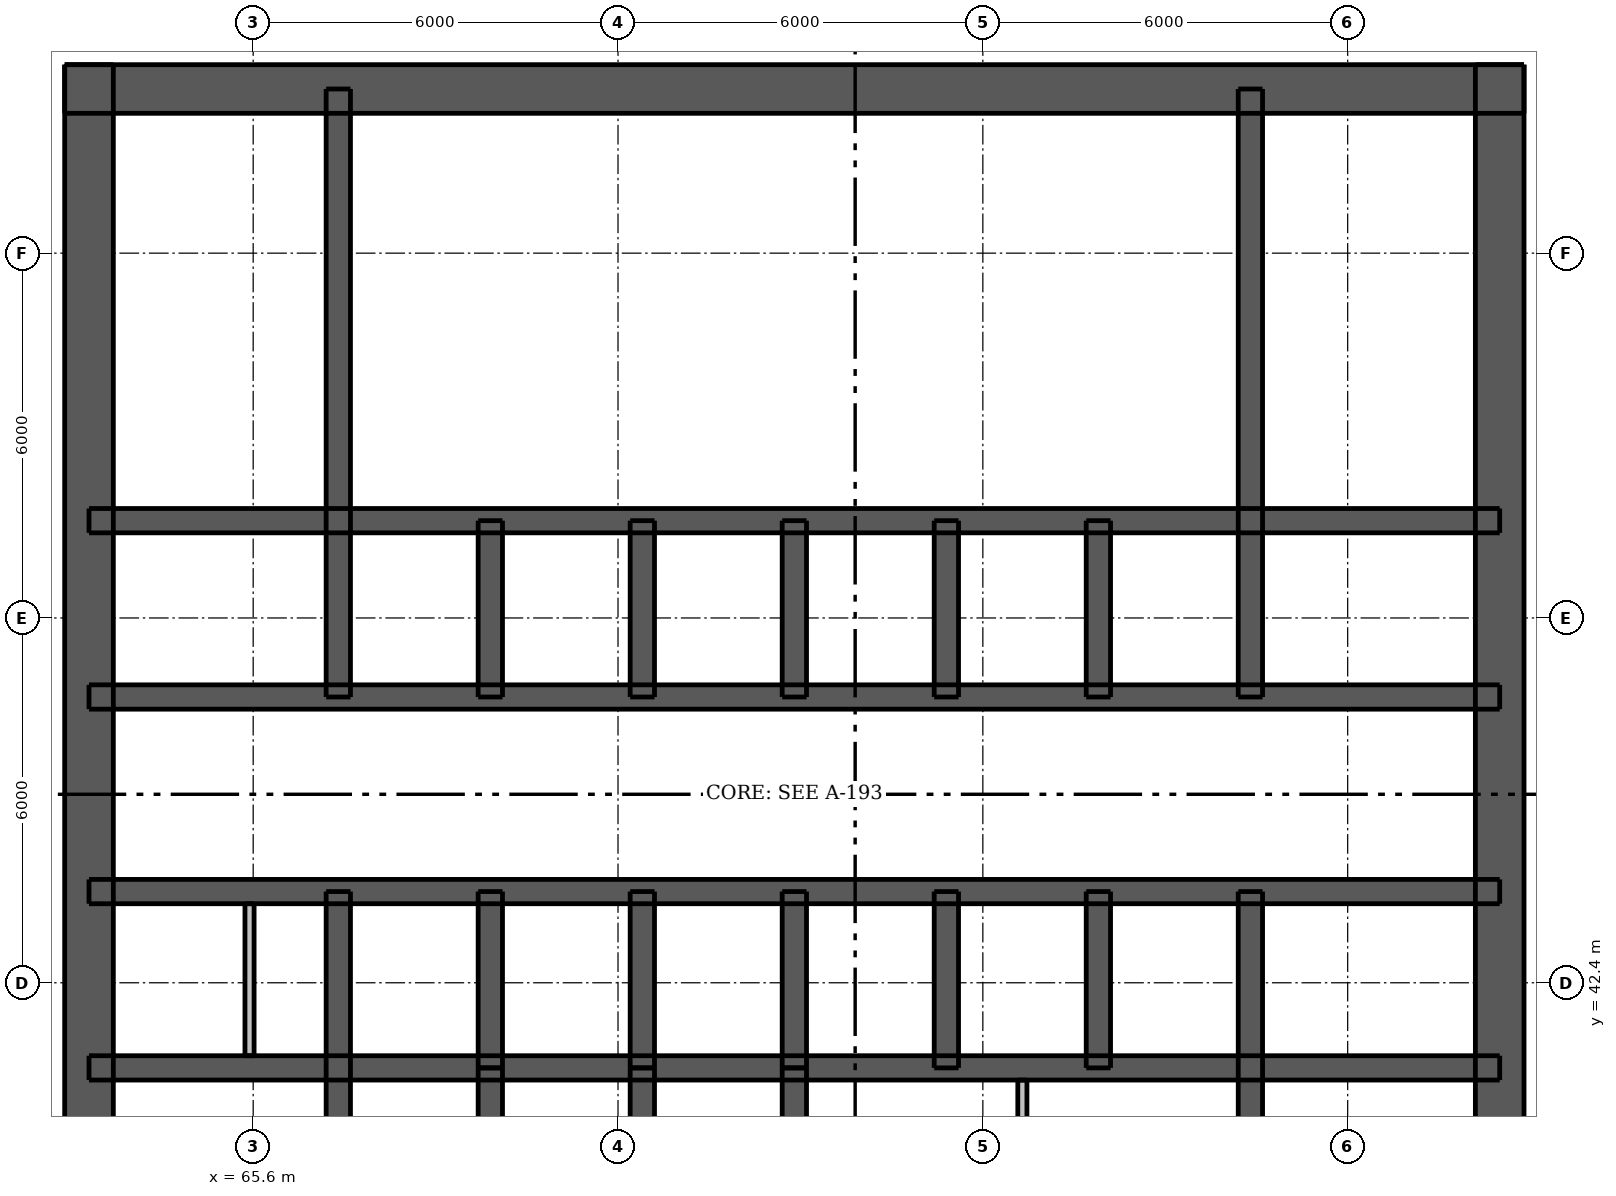
"""IFC4 building model, lengths in metres.
Left out: names, types, materials, properties, quantities, classifications, styles, units other than length and angle.
Written with IfcOpenShell. Run it as: python <this file> out.ifc"""

import sys

from ifc_helpers import new_model, si_unit, direction, frame, frame_2d, origin, place, context, subcontext, project, spatial, rectangle, extrude, element, fill, save


model = new_model("IFC4")
c1 = context("Model", 3, precision=1e-05, world=origin(), true_north=direction((0.0, 1.0)))
c2 = subcontext(c1, "Body", "Model", "MODEL_VIEW")
j1 = project(units=[si_unit("LENGTHUNIT", "METRE"), si_unit("PLANEANGLEUNIT", "RADIAN")], contexts=[c1])
p1 = place(None, origin())
s1 = spatial("IfcSite", under=j1, at=p1, CompositionType="ELEMENT")
p2 = place(p1, origin())
s2 = spatial("IfcBuilding", under=s1, at=p2, CompositionType="ELEMENT")
p3 = place(p2, frame((0.0, 0.0, 95.2)))
s3 = spatial("IfcBuildingStorey", under=s2, at=p3, CompositionType="ELEMENT", Elevation=95.2)
p4 = place(p3, frame((62.5, 57.1, 0.0), z_axis=(0.0, 0.0, 1.0), x_axis=(1.0, 0.0, 0.0)))
e1 = element("IfcWall", 1, at=p4, inside=s3, PredefinedType="SHEAR", context=c2, shape_type="SweptSolid", body=[
    extrude(rectangle(XDim=24.0, YDim=0.8, at=frame_2d((12.0, 0.0))), origin(), (0.0, 0.0, 1.0), 3.05),
])
p5 = place(p4, frame((20.9, 0.0, 0.0)))
e2 = element("IfcOpeningElement", 2, at=p5, cuts=e1, PredefinedType="OPENING", context=c2, shape_type="SweptSolid", body=[
    extrude(rectangle(XDim=1.1, YDim=2.1, at=frame_2d((0.55, 1.05))), frame((0.0, 0.41, 0.0), z_axis=(0.0, -1.0, 0.0), x_axis=(1.0, 0.0, 0.0)), (0.0, 0.0, 1.0), 0.82),
])
p6 = place(p4, frame((2.0, 0.0, 0.0)))
e3 = element("IfcOpeningElement", 3, at=p6, cuts=e1, PredefinedType="OPENING", context=c2, shape_type="SweptSolid", body=[
    extrude(rectangle(XDim=1.1, YDim=2.1, at=frame_2d((0.55, 1.05))), frame((0.0, 0.41, 0.0), z_axis=(0.0, -1.0, 0.0), x_axis=(1.0, 0.0, 0.0)), (0.0, 0.0, 1.0), 0.82),
])
p7 = place(p4, frame((11.55, 0.0, 0.0)))
e4 = element("IfcOpeningElement", 4, at=p7, cuts=e1, PredefinedType="OPENING", context=c2, shape_type="SweptSolid", body=[
    extrude(rectangle(XDim=0.9, YDim=2.1, at=frame_2d((0.45, 1.05))), frame((0.0, 0.41, 0.0), z_axis=(0.0, -1.0, 0.0), x_axis=(1.0, 0.0, 0.0)), (0.0, 0.0, 1.0), 0.82),
])
p8 = place(p3, frame((62.9, 33.5, 0.0), z_axis=(0.0, 0.0, 1.0), x_axis=(0.0, 1.0, 0.0)))
e5 = element("IfcWall", 5, at=p8, inside=s3, PredefinedType="SHEAR", context=c2, shape_type="SweptSolid", body=[
    extrude(rectangle(XDim=24.0, YDim=0.8, at=frame_2d((12.0, 0.0))), origin(), (0.0, 0.0, 1.0), 3.05),
])
p9 = place(p8, frame((11.2, 0.0, 0.0)))
e6 = element("IfcOpeningElement", 6, at=p9, cuts=e5, PredefinedType="OPENING", context=c2, shape_type="SweptSolid", body=[
    extrude(rectangle(XDim=1.6, YDim=2.1, at=frame_2d((0.8, 1.05))), frame((0.0, 0.41, 0.0), z_axis=(0.0, -1.0, 0.0), x_axis=(1.0, 0.0, 0.0)), (0.0, 0.0, 1.0), 0.82),
])
p10 = place(p3, frame((86.1, 33.5, 0.0), z_axis=(0.0, 0.0, 1.0), x_axis=(0.0, 1.0, 0.0)))
e7 = element("IfcWall", 7, at=p10, inside=s3, PredefinedType="SHEAR", context=c2, shape_type="SweptSolid", body=[
    extrude(rectangle(XDim=24.0, YDim=0.8, at=frame_2d((12.0, 0.0))), origin(), (0.0, 0.0, 1.0), 3.05),
])
p11 = place(p10, frame((11.2, 0.0, 0.0)))
e8 = element("IfcOpeningElement", 8, at=p11, cuts=e7, PredefinedType="OPENING", context=c2, shape_type="SweptSolid", body=[
    extrude(rectangle(XDim=1.6, YDim=2.1, at=frame_2d((0.8, 1.05))), frame((0.0, 0.41, 0.0), z_axis=(0.0, -1.0, 0.0), x_axis=(1.0, 0.0, 0.0)), (0.0, 0.0, 1.0), 0.82),
])
p12 = place(p3, frame((62.9, 41.0, 0.0), z_axis=(0.0, 0.0, 1.0), x_axis=(1.0, 0.0, 0.0)))
e9 = element("IfcWall", 9, at=p12, inside=s3, PredefinedType="SHEAR", context=c2, shape_type="SweptSolid", body=[
    extrude(rectangle(XDim=23.2, YDim=0.4, at=frame_2d((11.6, 0.0))), origin(), (0.0, 0.0, 1.0), 3.05),
])
p13 = place(p3, frame((62.9, 43.9, 0.0), z_axis=(0.0, 0.0, 1.0), x_axis=(1.0, 0.0, 0.0)))
e10 = element("IfcWall", 10, at=p13, inside=s3, PredefinedType="SHEAR", context=c2, shape_type="SweptSolid", body=[
    extrude(rectangle(XDim=23.2, YDim=0.4, at=frame_2d((11.6, 0.0))), origin(), (0.0, 0.0, 1.0), 3.05),
])
p14 = place(p13, frame((1.07, 0.0, 0.0)))
e11 = element("IfcOpeningElement", 11, at=p14, cuts=e10, PredefinedType="OPENING", context=c2, shape_type="SweptSolid", body=[
    extrude(rectangle(XDim=0.9, YDim=2.1, at=frame_2d((0.45, 1.05))), frame((0.0, 0.21, 0.0), z_axis=(0.0, -1.0, 0.0), x_axis=(1.0, 0.0, 0.0)), (0.0, 0.0, 1.0), 0.42),
])
p15 = place(p13, frame((2.87, 0.0, 0.0)))
e12 = element("IfcOpeningElement", 12, at=p15, cuts=e10, PredefinedType="OPENING", context=c2, shape_type="SweptSolid", body=[
    extrude(rectangle(XDim=0.8, YDim=2.1, at=frame_2d((0.4, 1.05))), frame((0.0, 0.21, 0.0), z_axis=(0.0, -1.0, 0.0), x_axis=(1.0, 0.0, 0.0)), (0.0, 0.0, 1.0), 0.42),
])
p16 = place(p13, frame((20.6, 0.0, 0.0)))
e13 = element("IfcOpeningElement", 13, at=p16, cuts=e10, PredefinedType="OPENING", context=c2, shape_type="SweptSolid", body=[
    extrude(rectangle(XDim=0.9, YDim=2.1, at=frame_2d((0.45, 1.05))), frame((0.0, 0.21, 0.0), z_axis=(0.0, -1.0, 0.0), x_axis=(1.0, 0.0, 0.0)), (0.0, 0.0, 1.0), 0.42),
])
p17 = place(p13, frame((4.8, 0.0, 0.0)))
e14 = element("IfcOpeningElement", 14, at=p17, cuts=e10, PredefinedType="OPENING", context=c2, shape_type="SweptSolid", body=[
    extrude(rectangle(XDim=1.1, YDim=2.1, at=frame_2d((0.55, 1.05))), frame((0.0, 0.21, 0.0), z_axis=(0.0, -1.0, 0.0), x_axis=(1.0, 0.0, 0.0)), (0.0, 0.0, 1.0), 0.42),
])
p18 = place(p13, frame((7.3, 0.0, 0.0)))
e15 = element("IfcOpeningElement", 15, at=p18, cuts=e10, PredefinedType="OPENING", context=c2, shape_type="SweptSolid", body=[
    extrude(rectangle(XDim=1.1, YDim=2.1, at=frame_2d((0.55, 1.05))), frame((0.0, 0.21, 0.0), z_axis=(0.0, -1.0, 0.0), x_axis=(1.0, 0.0, 0.0)), (0.0, 0.0, 1.0), 0.42),
])
p19 = place(p13, frame((9.8, 0.0, 0.0)))
e16 = element("IfcOpeningElement", 16, at=p19, cuts=e10, PredefinedType="OPENING", context=c2, shape_type="SweptSolid", body=[
    extrude(rectangle(XDim=1.1, YDim=2.1, at=frame_2d((0.55, 1.05))), frame((0.0, 0.21, 0.0), z_axis=(0.0, -1.0, 0.0), x_axis=(1.0, 0.0, 0.0)), (0.0, 0.0, 1.0), 0.42),
])
p20 = place(p13, frame((12.3, 0.0, 0.0)))
e17 = element("IfcOpeningElement", 17, at=p20, cuts=e10, PredefinedType="OPENING", context=c2, shape_type="SweptSolid", body=[
    extrude(rectangle(XDim=1.1, YDim=2.1, at=frame_2d((0.55, 1.05))), frame((0.0, 0.21, 0.0), z_axis=(0.0, -1.0, 0.0), x_axis=(1.0, 0.0, 0.0)), (0.0, 0.0, 1.0), 0.42),
])
p21 = place(p13, frame((14.8, 0.0, 0.0)))
e18 = element("IfcOpeningElement", 18, at=p21, cuts=e10, PredefinedType="OPENING", context=c2, shape_type="SweptSolid", body=[
    extrude(rectangle(XDim=1.1, YDim=2.1, at=frame_2d((0.55, 1.05))), frame((0.0, 0.21, 0.0), z_axis=(0.0, -1.0, 0.0), x_axis=(1.0, 0.0, 0.0)), (0.0, 0.0, 1.0), 0.42),
])
p22 = place(p13, frame((17.3, 0.0, 0.0)))
e19 = element("IfcOpeningElement", 19, at=p22, cuts=e10, PredefinedType="OPENING", context=c2, shape_type="SweptSolid", body=[
    extrude(rectangle(XDim=1.1, YDim=2.1, at=frame_2d((0.55, 1.05))), frame((0.0, 0.21, 0.0), z_axis=(0.0, -1.0, 0.0), x_axis=(1.0, 0.0, 0.0)), (0.0, 0.0, 1.0), 0.42),
])
p23 = place(p3, frame((62.9, 47.1, 0.0), z_axis=(0.0, 0.0, 1.0), x_axis=(1.0, 0.0, 0.0)))
e20 = element("IfcWall", 20, at=p23, inside=s3, PredefinedType="SHEAR", context=c2, shape_type="SweptSolid", body=[
    extrude(rectangle(XDim=23.2, YDim=0.4, at=frame_2d((11.6, 0.0))), origin(), (0.0, 0.0, 1.0), 3.05),
])
p24 = place(p23, frame((1.7, 0.0, 0.0)))
e21 = element("IfcOpeningElement", 21, at=p24, cuts=e20, PredefinedType="OPENING", context=c2, shape_type="SweptSolid", body=[
    extrude(rectangle(XDim=0.9, YDim=2.1, at=frame_2d((0.45, 1.05))), frame((0.0, 0.21, 0.0), z_axis=(0.0, -1.0, 0.0), x_axis=(1.0, 0.0, 0.0)), (0.0, 0.0, 1.0), 0.42),
])
p25 = place(p23, frame((20.6, 0.0, 0.0)))
e22 = element("IfcOpeningElement", 22, at=p25, cuts=e20, PredefinedType="OPENING", context=c2, shape_type="SweptSolid", body=[
    extrude(rectangle(XDim=0.9, YDim=2.1, at=frame_2d((0.45, 1.05))), frame((0.0, 0.21, 0.0), z_axis=(0.0, -1.0, 0.0), x_axis=(1.0, 0.0, 0.0)), (0.0, 0.0, 1.0), 0.42),
])
p26 = place(p3, frame((62.9, 50.0, 0.0), z_axis=(0.0, 0.0, 1.0), x_axis=(1.0, 0.0, 0.0)))
e23 = element("IfcWall", 23, at=p26, inside=s3, PredefinedType="SHEAR", context=c2, shape_type="SweptSolid", body=[
    extrude(rectangle(XDim=23.2, YDim=0.4, at=frame_2d((11.6, 0.0))), origin(), (0.0, 0.0, 1.0), 3.05),
])
p27 = place(p3, frame((67.0, 33.9, 0.0), z_axis=(0.0, 0.0, 1.0), x_axis=(0.0, 1.0, 0.0)))
e24 = element("IfcWall", 24, at=p27, inside=s3, PredefinedType="SHEAR", context=c2, shape_type="SweptSolid", body=[
    extrude(rectangle(XDim=10.0, YDim=0.4, at=frame_2d((5.0, 0.0))), origin(), (0.0, 0.0, 1.0), 3.05),
])
p28 = place(p27, frame((0.6, 0.0, 0.0)))
e25 = element("IfcOpeningElement", 25, at=p28, cuts=e24, PredefinedType="OPENING", context=c2, shape_type="SweptSolid", body=[
    extrude(rectangle(XDim=1.1, YDim=2.1, at=frame_2d((0.55, 1.05))), frame((0.0, 0.21, 0.0), z_axis=(0.0, -1.0, 0.0), x_axis=(1.0, 0.0, 0.0)), (0.0, 0.0, 1.0), 0.42),
])
for number, where, z_axis, x_axis in (
    (26, (67.0, 47.1, 0.0), (0.0, 0.0, 1.0), (0.0, 1.0, 0.0)),
    (27, (82.0, 33.9, 0.0), (0.0, 0.0, 1.0), (0.0, 1.0, 0.0)),
    (28, (82.0, 47.1, 0.0), (0.0, 0.0, 1.0), (0.0, 1.0, 0.0)),
):
    element("IfcWall", number, at=place(p3, frame(where, z_axis=z_axis, x_axis=x_axis)), inside=s3, PredefinedType="SHEAR", context=c2, shape_type="SweptSolid", body=[
        extrude(rectangle(XDim=10.0, YDim=0.4, at=frame_2d((5.0, 0.0))), origin(), (0.0, 0.0, 1.0), 3.05),
    ])
for number, where, z_axis, x_axis in (
    (29, (69.5, 41.0, 0.0), (0.0, 0.0, 1.0), (0.0, 1.0, 0.0)),
    (30, (69.5, 47.1, 0.0), (0.0, 0.0, 1.0), (0.0, 1.0, 0.0)),
    (31, (72.0, 41.0, 0.0), (0.0, 0.0, 1.0), (0.0, 1.0, 0.0)),
    (32, (72.0, 47.1, 0.0), (0.0, 0.0, 1.0), (0.0, 1.0, 0.0)),
    (33, (74.5, 41.0, 0.0), (0.0, 0.0, 1.0), (0.0, 1.0, 0.0)),
    (34, (74.5, 47.1, 0.0), (0.0, 0.0, 1.0), (0.0, 1.0, 0.0)),
    (35, (77.0, 41.0, 0.0), (0.0, 0.0, 1.0), (0.0, 1.0, 0.0)),
    (36, (77.0, 47.1, 0.0), (0.0, 0.0, 1.0), (0.0, 1.0, 0.0)),
    (37, (79.5, 41.0, 0.0), (0.0, 0.0, 1.0), (0.0, 1.0, 0.0)),
    (38, (79.5, 47.1, 0.0), (0.0, 0.0, 1.0), (0.0, 1.0, 0.0)),
    (39, (69.5, 38.1, 0.0), (0.0, 0.0, 1.0), (0.0, 1.0, 0.0)),
    (40, (72.0, 38.1, 0.0), (0.0, 0.0, 1.0), (0.0, 1.0, 0.0)),
    (41, (74.5, 38.1, 0.0), (0.0, 0.0, 1.0), (0.0, 1.0, 0.0)),
):
    element("IfcWall", number, at=place(p3, frame(where, z_axis=z_axis, x_axis=x_axis)), inside=s3, PredefinedType="SHEAR", context=c2, shape_type="SweptSolid", body=[
        extrude(rectangle(XDim=2.9, YDim=0.4, at=frame_2d((1.45, 0.0))), origin(), (0.0, 0.0, 1.0), 3.05),
    ])
p29 = place(p3, frame((78.25, 34.3, 0.0), z_axis=(0.0, 0.0, 1.0), x_axis=(0.0, 1.0, 0.0)))
e42 = element("IfcWall", 42, at=p29, inside=s3, PredefinedType="PLUMBINGWALL", context=c2, shape_type="SweptSolid", body=[
    extrude(rectangle(XDim=6.5, YDim=0.15, at=frame_2d((3.25, 0.0))), origin(), (0.0, 0.0, 1.0), 3.05),
])
p30 = place(p3, frame((65.54, 41.2, 0.0), z_axis=(0.0, 0.0, 1.0), x_axis=(0.0, 1.0, 0.0)))
e43 = element("IfcWall", 43, at=p30, inside=s3, PredefinedType="PLUMBINGWALL", context=c2, shape_type="SweptSolid", body=[
    extrude(rectangle(XDim=2.5, YDim=0.15, at=frame_2d((1.25, 0.0))), origin(), (0.0, 0.0, 1.0), 3.05),
])
p31 = place(p5, origin())
e44 = element("IfcDoor", 44, at=p31, inside=s3, OperationType="SINGLE_SWING_RIGHT", PredefinedType="DOOR", context=c2, shape_type="SweptSolid", body=[
    extrude(rectangle(XDim=1.1, YDim=2.1, at=frame_2d((0.55, 1.05))), frame((0.0, -0.337, 0.0), z_axis=(0.0, -1.0, 0.0), x_axis=(1.0, 0.0, 0.0)), (0.0, 0.0, 1.0), 0.05),
])
fill(e2, e44)
p32 = place(p6, origin())
e45 = element("IfcDoor", 45, at=p32, inside=s3, OperationType="SINGLE_SWING_LEFT", PredefinedType="DOOR", context=c2, shape_type="SweptSolid", body=[
    extrude(rectangle(XDim=1.1, YDim=2.1, at=frame_2d((0.55, 1.05))), frame((0.0, -0.337, 0.0), z_axis=(0.0, -1.0, 0.0), x_axis=(1.0, 0.0, 0.0)), (0.0, 0.0, 1.0), 0.05),
])
fill(e3, e45)
p33 = place(p9, origin())
e46 = element("IfcDoor", 46, at=p33, inside=s3, OperationType="DOUBLE_DOOR_SINGLE_SWING", PredefinedType="DOOR", context=c2, shape_type="SweptSolid", body=[
    extrude(rectangle(XDim=1.6, YDim=2.1, at=frame_2d((0.8, 1.05))), frame((0.0, -0.337, 0.0), z_axis=(0.0, -1.0, 0.0), x_axis=(1.0, 0.0, 0.0)), (0.0, 0.0, 1.0), 0.05),
])
fill(e6, e46)
p34 = place(p11, origin())
e47 = element("IfcDoor", 47, at=p34, inside=s3, OperationType="DOUBLE_DOOR_SINGLE_SWING", PredefinedType="DOOR", context=c2, shape_type="SweptSolid", body=[
    extrude(rectangle(XDim=1.6, YDim=2.1, at=frame_2d((0.8, 1.05))), frame((0.0, 0.388, 0.0), z_axis=(0.0, -1.0, 0.0), x_axis=(1.0, 0.0, 0.0)), (0.0, 0.0, 1.0), 0.05),
])
fill(e8, e47)
p35 = place(p14, origin())
e48 = element("IfcDoor", 48, at=p35, inside=s3, OperationType="SINGLE_SWING_LEFT", PredefinedType="DOOR", context=c2, shape_type="SweptSolid", body=[
    extrude(rectangle(XDim=0.9, YDim=2.1, at=frame_2d((0.45, 1.05))), frame((0.0, -0.138, 0.0), z_axis=(0.0, -1.0, 0.0), x_axis=(1.0, 0.0, 0.0)), (0.0, 0.0, 1.0), 0.05),
])
fill(e11, e48)
p36 = place(p15, origin())
e49 = element("IfcDoor", 49, at=p36, inside=s3, OperationType="SINGLE_SWING_RIGHT", PredefinedType="DOOR", context=c2, shape_type="SweptSolid", body=[
    extrude(rectangle(XDim=0.8, YDim=2.1, at=frame_2d((0.4, 1.05))), frame((0.0, -0.138, 0.0), z_axis=(0.0, -1.0, 0.0), x_axis=(1.0, 0.0, 0.0)), (0.0, 0.0, 1.0), 0.05),
])
fill(e12, e49)
p37 = place(p16, origin())
e50 = element("IfcDoor", 50, at=p37, inside=s3, OperationType="SINGLE_SWING_LEFT", PredefinedType="DOOR", context=c2, shape_type="SweptSolid", body=[
    extrude(rectangle(XDim=0.9, YDim=2.1, at=frame_2d((0.45, 1.05))), frame((0.0, -0.138, 0.0), z_axis=(0.0, -1.0, 0.0), x_axis=(1.0, 0.0, 0.0)), (0.0, 0.0, 1.0), 0.05),
])
fill(e13, e50)
p38 = place(p24, origin())
e51 = element("IfcDoor", 51, at=p38, inside=s3, OperationType="SINGLE_SWING_LEFT", PredefinedType="DOOR", context=c2, shape_type="SweptSolid", body=[
    extrude(rectangle(XDim=0.9, YDim=2.1, at=frame_2d((0.45, 1.05))), frame((0.0, 0.188, 0.0), z_axis=(0.0, -1.0, 0.0), x_axis=(1.0, 0.0, 0.0)), (0.0, 0.0, 1.0), 0.05),
])
fill(e21, e51)
p39 = place(p25, origin())
e52 = element("IfcDoor", 52, at=p39, inside=s3, OperationType="SINGLE_SWING_LEFT", PredefinedType="DOOR", context=c2, shape_type="SweptSolid", body=[
    extrude(rectangle(XDim=0.9, YDim=2.1, at=frame_2d((0.45, 1.05))), frame((0.0, 0.188, 0.0), z_axis=(0.0, -1.0, 0.0), x_axis=(1.0, 0.0, 0.0)), (0.0, 0.0, 1.0), 0.05),
])
fill(e22, e52)
p40 = place(p7, origin())
e53 = element("IfcDoor", 53, at=p40, inside=s3, OperationType="SINGLE_SWING_RIGHT", PredefinedType="DOOR", context=c2, shape_type="SweptSolid", body=[
    extrude(rectangle(XDim=0.9, YDim=2.1, at=frame_2d((0.45, 1.05))), frame((0.0, -0.337, 0.0), z_axis=(0.0, -1.0, 0.0), x_axis=(1.0, 0.0, 0.0)), (0.0, 0.0, 1.0), 0.05),
])
fill(e4, e53)
p41 = place(p17, origin())
e54 = element("IfcDoor", 54, at=p41, inside=s3, OperationType="DOUBLE_DOOR_SLIDING", PredefinedType="DOOR", context=c2, shape_type="SweptSolid", body=[
    extrude(rectangle(XDim=1.1, YDim=2.1, at=frame_2d((0.55, 1.05))), frame((0.0, 0.025, 0.0), z_axis=(0.0, -1.0, 0.0), x_axis=(1.0, 0.0, 0.0)), (0.0, 0.0, 1.0), 0.05),
])
fill(e14, e54)
p42 = place(p18, origin())
e55 = element("IfcDoor", 55, at=p42, inside=s3, OperationType="DOUBLE_DOOR_SLIDING", PredefinedType="DOOR", context=c2, shape_type="SweptSolid", body=[
    extrude(rectangle(XDim=1.1, YDim=2.1, at=frame_2d((0.55, 1.05))), frame((0.0, 0.025, 0.0), z_axis=(0.0, -1.0, 0.0), x_axis=(1.0, 0.0, 0.0)), (0.0, 0.0, 1.0), 0.05),
])
fill(e15, e55)
p43 = place(p19, origin())
e56 = element("IfcDoor", 56, at=p43, inside=s3, OperationType="DOUBLE_DOOR_SLIDING", PredefinedType="DOOR", context=c2, shape_type="SweptSolid", body=[
    extrude(rectangle(XDim=1.1, YDim=2.1, at=frame_2d((0.55, 1.05))), frame((0.0, 0.025, 0.0), z_axis=(0.0, -1.0, 0.0), x_axis=(1.0, 0.0, 0.0)), (0.0, 0.0, 1.0), 0.05),
])
fill(e16, e56)
p44 = place(p20, origin())
e57 = element("IfcDoor", 57, at=p44, inside=s3, OperationType="DOUBLE_DOOR_SLIDING", PredefinedType="DOOR", context=c2, shape_type="SweptSolid", body=[
    extrude(rectangle(XDim=1.1, YDim=2.1, at=frame_2d((0.55, 1.05))), frame((0.0, 0.025, 0.0), z_axis=(0.0, -1.0, 0.0), x_axis=(1.0, 0.0, 0.0)), (0.0, 0.0, 1.0), 0.05),
])
fill(e17, e57)
p45 = place(p21, origin())
e58 = element("IfcDoor", 58, at=p45, inside=s3, OperationType="DOUBLE_DOOR_SLIDING", PredefinedType="DOOR", context=c2, shape_type="SweptSolid", body=[
    extrude(rectangle(XDim=1.1, YDim=2.1, at=frame_2d((0.55, 1.05))), frame((0.0, 0.025, 0.0), z_axis=(0.0, -1.0, 0.0), x_axis=(1.0, 0.0, 0.0)), (0.0, 0.0, 1.0), 0.05),
])
fill(e18, e58)
p46 = place(p22, origin())
e59 = element("IfcDoor", 59, at=p46, inside=s3, OperationType="DOUBLE_DOOR_SLIDING", PredefinedType="DOOR", context=c2, shape_type="SweptSolid", body=[
    extrude(rectangle(XDim=1.1, YDim=2.1, at=frame_2d((0.55, 1.05))), frame((0.0, 0.025, 0.0), z_axis=(0.0, -1.0, 0.0), x_axis=(1.0, 0.0, 0.0)), (0.0, 0.0, 1.0), 0.05),
])
fill(e19, e59)
save(model, sys.argv[1])
